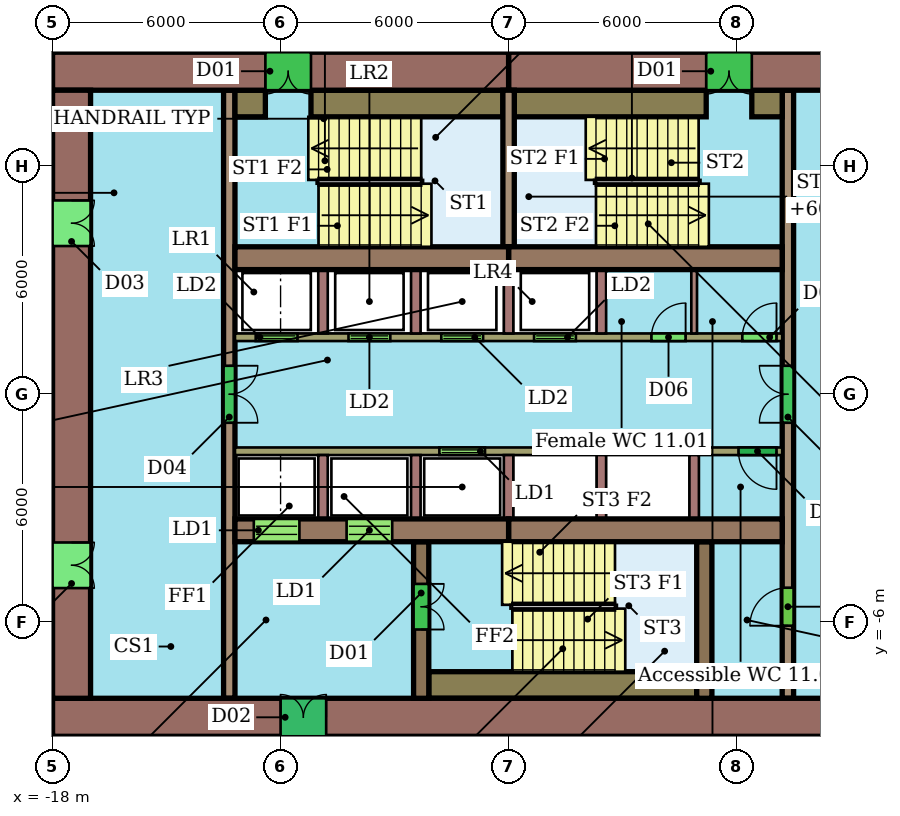
"""IFC4 building model, lengths in metres.
Left out: names, types, materials, properties, quantities, classifications, styles, units other than length and angle.
Written with IfcOpenShell. Run it as: python <this file> out.ifc"""

import sys

from ifc_helpers import new_model, si_unit, direction, frame, frame_2d, origin, place, context, subcontext, project, spatial, rectangle, extrude, element, fill, save


model = new_model("IFC4")
c1 = context("Model", 3, precision=1e-05, world=origin(), true_north=direction((0.0, 1.0)))
c2 = subcontext(c1, "Body", "Model", "MODEL_VIEW")
j1 = project(units=[si_unit("LENGTHUNIT", "METRE"), si_unit("PLANEANGLEUNIT", "RADIAN")], contexts=[c1])
p1 = place(None, origin())
s1 = spatial("IfcSite", under=j1, at=p1, CompositionType="ELEMENT")
p2 = place(p1, origin())
s2 = spatial("IfcBuilding", under=s1, at=p2, CompositionType="ELEMENT")
p3 = place(p2, frame((0.0, 0.0, 58.2)))
s3 = spatial("IfcBuildingStorey", under=s2, at=p3, CompositionType="ELEMENT", Elevation=58.2)
p4 = place(p3, frame((6.0, 8.5, 0.0), z_axis=(0.0, 0.0, 1.0), x_axis=(-1.0, 0.0, 0.0)))
e1 = element("IfcWall", 1, at=p4, inside=s3, PredefinedType="SHEAR", context=c2, shape_type="SweptSolid", body=[
    extrude(rectangle(XDim=12.0, YDim=1.0, at=frame_2d((6.0, 0.0))), origin(), (0.0, 0.0, 1.0), 3.4),
])
p5 = place(p4, frame((5.6, 0.0, 0.0)))
e2 = element("IfcOpeningElement", 2, at=p5, cuts=e1, PredefinedType="OPENING", context=c2, shape_type="SweptSolid", body=[
    extrude(rectangle(XDim=1.2, YDim=2.1, at=frame_2d((0.6, 1.05))), frame((0.0, 0.51, 0.0), z_axis=(0.0, -1.0, 0.0), x_axis=(1.0, 0.0, 0.0)), (0.0, 0.0, 1.0), 1.02),
])
p6 = place(p3, frame((-6.0, 8.5, 0.0), z_axis=(0.0, 0.0, 1.0), x_axis=(-1.0, 0.0, 0.0)))
e3 = element("IfcWall", 3, at=p6, inside=s3, PredefinedType="SHEAR", context=c2, shape_type="SweptSolid", body=[
    extrude(rectangle(XDim=12.0, YDim=1.0, at=frame_2d((6.0, 0.0))), origin(), (0.0, 0.0, 1.0), 3.4),
])
p7 = place(p6, frame((5.2, 0.0, 0.0)))
e4 = element("IfcOpeningElement", 4, at=p7, cuts=e3, PredefinedType="OPENING", context=c2, shape_type="SweptSolid", body=[
    extrude(rectangle(XDim=1.2, YDim=2.1, at=frame_2d((0.6, 1.05))), frame((0.0, 0.51, 0.0), z_axis=(0.0, -1.0, 0.0), x_axis=(1.0, 0.0, 0.0)), (0.0, 0.0, 1.0), 1.02),
])
p8 = place(p3, frame((-18.0, -8.5, 0.0), z_axis=(0.0, 0.0, 1.0), x_axis=(1.0, 0.0, 0.0)))
e5 = element("IfcWall", 5, at=p8, inside=s3, PredefinedType="SHEAR", context=c2, shape_type="SweptSolid", body=[
    extrude(rectangle(XDim=24.0, YDim=1.0, at=frame_2d((12.0, 0.0))), origin(), (0.0, 0.0, 1.0), 3.4),
])
p9 = place(p8, frame((6.0, 0.0, 0.0)))
e6 = element("IfcOpeningElement", 6, at=p9, cuts=e5, PredefinedType="OPENING", context=c2, shape_type="SweptSolid", body=[
    extrude(rectangle(XDim=1.2, YDim=2.1, at=frame_2d((0.6, 1.05))), frame((0.0, 0.51, 0.0), z_axis=(0.0, -1.0, 0.0), x_axis=(1.0, 0.0, 0.0)), (0.0, 0.0, 1.0), 1.02),
])
p10 = place(p3, frame((-17.5, 8.0, 0.0), z_axis=(0.0, 0.0, 1.0), x_axis=(0.0, -1.0, 0.0)))
e7 = element("IfcWall", 7, at=p10, inside=s3, PredefinedType="SHEAR", context=c2, shape_type="SweptSolid", body=[
    extrude(rectangle(XDim=16.0, YDim=1.0, at=frame_2d((8.0, 0.0))), origin(), (0.0, 0.0, 1.0), 3.4),
])
p11 = place(p10, frame((11.9, 0.0, 0.0)))
e8 = element("IfcOpeningElement", 8, at=p11, cuts=e7, PredefinedType="OPENING", context=c2, shape_type="SweptSolid", body=[
    extrude(rectangle(XDim=1.2, YDim=2.1, at=frame_2d((0.6, 1.05))), frame((0.0, 0.51, 0.0), z_axis=(0.0, -1.0, 0.0), x_axis=(1.0, 0.0, 0.0)), (0.0, 0.0, 1.0), 1.02),
])
p12 = place(p10, frame((2.9, 0.0, 0.0)))
e9 = element("IfcOpeningElement", 9, at=p12, cuts=e7, PredefinedType="OPENING", context=c2, shape_type="SweptSolid", body=[
    extrude(rectangle(XDim=1.2, YDim=2.1, at=frame_2d((0.6, 1.05))), frame((0.0, 0.51, 0.0), z_axis=(0.0, -1.0, 0.0), x_axis=(1.0, 0.0, 0.0)), (0.0, 0.0, 1.0), 1.02),
])
for number, where, z_axis, x_axis in (
    (10, (-13.2, 3.58, 0.0), (0.0, 0.0, 1.0), (1.0, 0.0, 0.0)),
    (11, (-6.0, 3.58, 0.0), (0.0, 0.0, 1.0), (1.0, 0.0, 0.0)),
):
    element("IfcWall", number, at=place(p3, frame(where, z_axis=z_axis, x_axis=x_axis)), inside=s3, PredefinedType="SHEAR", context=c2, shape_type="SweptSolid", body=[
        extrude(rectangle(XDim=7.2, YDim=0.6, at=frame_2d((3.6, 0.0))), origin(), (0.0, 0.0, 1.0), 3.4),
    ])
p13 = place(p3, frame((-13.2, -3.58, 0.0), z_axis=(0.0, 0.0, 1.0), x_axis=(1.0, 0.0, 0.0)))
e12 = element("IfcWall", 12, at=p13, inside=s3, PredefinedType="SHEAR", context=c2, shape_type="SweptSolid", body=[
    extrude(rectangle(XDim=7.2, YDim=0.6, at=frame_2d((3.6, 0.0))), origin(), (0.0, 0.0, 1.0), 3.4),
])
p14 = place(p13, frame((0.496, 0.0, 0.0)))
e13 = element("IfcOpeningElement", 13, at=p14, cuts=e12, PredefinedType="OPENING", context=c2, shape_type="SweptSolid", body=[
    extrude(rectangle(XDim=1.2, YDim=2.1, at=frame_2d((0.6, 1.05))), frame((0.0, 0.31, 0.0), z_axis=(0.0, -1.0, 0.0), x_axis=(1.0, 0.0, 0.0)), (0.0, 0.0, 1.0), 0.62),
])
p15 = place(p13, frame((2.938, 0.0, 0.0)))
e14 = element("IfcOpeningElement", 14, at=p15, cuts=e12, PredefinedType="OPENING", context=c2, shape_type="SweptSolid", body=[
    extrude(rectangle(XDim=1.2, YDim=2.1, at=frame_2d((0.6, 1.05))), frame((0.0, 0.31, 0.0), z_axis=(0.0, -1.0, 0.0), x_axis=(1.0, 0.0, 0.0)), (0.0, 0.0, 1.0), 0.62),
])
p16 = place(p3, frame((-6.0, -3.58, 0.0), z_axis=(0.0, 0.0, 1.0), x_axis=(1.0, 0.0, 0.0)))
e15 = element("IfcWall", 15, at=p16, inside=s3, PredefinedType="SHEAR", context=c2, shape_type="SweptSolid", body=[
    extrude(rectangle(XDim=7.2, YDim=0.6, at=frame_2d((3.6, 0.0))), origin(), (0.0, 0.0, 1.0), 3.4),
])
p17 = place(p3, frame((-13.35, 8.0, 0.0), z_axis=(0.0, 0.0, 1.0), x_axis=(0.0, -1.0, 0.0)))
e16 = element("IfcWall", 16, at=p17, inside=s3, PredefinedType="SHEAR", context=c2, shape_type="SweptSolid", body=[
    extrude(rectangle(XDim=16.0, YDim=0.3, at=frame_2d((8.0, 0.0))), origin(), (0.0, 0.0, 1.0), 3.4),
])
p18 = place(p17, frame((7.25, 0.0, 0.0)))
e17 = element("IfcOpeningElement", 17, at=p18, cuts=e16, PredefinedType="OPENING", context=c2, shape_type="SweptSolid", body=[
    extrude(rectangle(XDim=1.5, YDim=2.1, at=frame_2d((0.75, 1.05))), frame((0.0, 0.16, 0.0), z_axis=(0.0, -1.0, 0.0), x_axis=(1.0, 0.0, 0.0)), (0.0, 0.0, 1.0), 0.32),
])
p19 = place(p3, frame((1.35, -8.0, 0.0), z_axis=(0.0, 0.0, 1.0), x_axis=(0.0, 1.0, 0.0)))
e18 = element("IfcWall", 18, at=p19, inside=s3, PredefinedType="SHEAR", context=c2, shape_type="SweptSolid", body=[
    extrude(rectangle(XDim=16.0, YDim=0.3, at=frame_2d((8.0, 0.0))), origin(), (0.0, 0.0, 1.0), 3.4),
])
p20 = place(p19, frame((1.91, 0.0, 0.0)))
e19 = element("IfcOpeningElement", 19, at=p20, cuts=e18, PredefinedType="OPENING", context=c2, shape_type="SweptSolid", body=[
    extrude(rectangle(XDim=1.0, YDim=2.1, at=frame_2d((0.5, 1.05))), frame((0.0, 0.16, 0.0), z_axis=(0.0, -1.0, 0.0), x_axis=(1.0, 0.0, 0.0)), (0.0, 0.0, 1.0), 0.32),
])
p21 = place(p19, frame((7.25, 0.0, 0.0)))
e20 = element("IfcOpeningElement", 20, at=p21, cuts=e18, PredefinedType="OPENING", context=c2, shape_type="SweptSolid", body=[
    extrude(rectangle(XDim=1.5, YDim=2.1, at=frame_2d((0.75, 1.05))), frame((0.0, 0.16, 0.0), z_axis=(0.0, -1.0, 0.0), x_axis=(1.0, 0.0, 0.0)), (0.0, 0.0, 1.0), 0.32),
])
p22 = place(p3, frame((-13.2, 1.5, 0.0), z_axis=(0.0, 0.0, 1.0), x_axis=(1.0, 0.0, 0.0)))
e21 = element("IfcWall", 21, at=p22, inside=s3, PredefinedType="SHEAR", context=c2, shape_type="SweptSolid", body=[
    extrude(rectangle(XDim=14.4, YDim=0.2, at=frame_2d((7.2, 0.0))), origin(), (0.0, 0.0, 1.0), 3.4),
])
p23 = place(p22, frame((0.546, 0.0, 0.0)))
e22 = element("IfcOpeningElement", 22, at=p23, cuts=e21, PredefinedType="OPENING", context=c2, shape_type="SweptSolid", body=[
    extrude(rectangle(XDim=1.1, YDim=2.1, at=frame_2d((0.55, 1.05))), frame((0.0, 0.11, 0.0), z_axis=(0.0, -1.0, 0.0), x_axis=(1.0, 0.0, 0.0)), (0.0, 0.0, 1.0), 0.22),
])
p24 = place(p22, frame((2.988, 0.0, 0.0)))
e23 = element("IfcOpeningElement", 23, at=p24, cuts=e21, PredefinedType="OPENING", context=c2, shape_type="SweptSolid", body=[
    extrude(rectangle(XDim=1.1, YDim=2.1, at=frame_2d((0.55, 1.05))), frame((0.0, 0.11, 0.0), z_axis=(0.0, -1.0, 0.0), x_axis=(1.0, 0.0, 0.0)), (0.0, 0.0, 1.0), 0.22),
])
p25 = place(p22, frame((5.429, 0.0, 0.0)))
e24 = element("IfcOpeningElement", 24, at=p25, cuts=e21, PredefinedType="OPENING", context=c2, shape_type="SweptSolid", body=[
    extrude(rectangle(XDim=1.1, YDim=2.1, at=frame_2d((0.55, 1.05))), frame((0.0, 0.11, 0.0), z_axis=(0.0, -1.0, 0.0), x_axis=(1.0, 0.0, 0.0)), (0.0, 0.0, 1.0), 0.22),
])
p26 = place(p22, frame((7.871, 0.0, 0.0)))
e25 = element("IfcOpeningElement", 25, at=p26, cuts=e21, PredefinedType="OPENING", context=c2, shape_type="SweptSolid", body=[
    extrude(rectangle(XDim=1.1, YDim=2.1, at=frame_2d((0.55, 1.05))), frame((0.0, 0.11, 0.0), z_axis=(0.0, -1.0, 0.0), x_axis=(1.0, 0.0, 0.0)), (0.0, 0.0, 1.0), 0.22),
])
p27 = place(p22, frame((10.958, 0.0, 0.0)))
e26 = element("IfcOpeningElement", 26, at=p27, cuts=e21, PredefinedType="OPENING", context=c2, shape_type="SweptSolid", body=[
    extrude(rectangle(XDim=0.9, YDim=2.1, at=frame_2d((0.45, 1.05))), frame((0.0, 0.11, 0.0), z_axis=(0.0, -1.0, 0.0), x_axis=(1.0, 0.0, 0.0)), (0.0, 0.0, 1.0), 0.22),
])
p28 = place(p22, frame((13.35, 0.0, 0.0)))
e27 = element("IfcOpeningElement", 27, at=p28, cuts=e21, PredefinedType="OPENING", context=c2, shape_type="SweptSolid", body=[
    extrude(rectangle(XDim=0.9, YDim=2.1, at=frame_2d((0.45, 1.05))), frame((0.0, 0.11, 0.0), z_axis=(0.0, -1.0, 0.0), x_axis=(1.0, 0.0, 0.0)), (0.0, 0.0, 1.0), 0.22),
])
p29 = place(p3, frame((1.2, -1.5, 0.0), z_axis=(0.0, 0.0, 1.0), x_axis=(-1.0, 0.0, 0.0)))
e28 = element("IfcWall", 28, at=p29, inside=s3, PredefinedType="SHEAR", context=c2, shape_type="SweptSolid", body=[
    extrude(rectangle(XDim=14.4, YDim=0.2, at=frame_2d((7.2, 0.0))), origin(), (0.0, 0.0, 1.0), 3.4),
])
p30 = place(p29, frame((7.821, 0.0, 0.0)))
e29 = element("IfcOpeningElement", 29, at=p30, cuts=e28, PredefinedType="OPENING", context=c2, shape_type="SweptSolid", body=[
    extrude(rectangle(XDim=1.2, YDim=2.1, at=frame_2d((0.6, 1.05))), frame((0.0, 0.11, 0.0), z_axis=(0.0, -1.0, 0.0), x_axis=(1.0, 0.0, 0.0)), (0.0, 0.0, 1.0), 0.22),
])
p31 = place(p29, frame((0.15, 0.0, 0.0)))
e30 = element("IfcOpeningElement", 30, at=p31, cuts=e28, PredefinedType="OPENING", context=c2, shape_type="SweptSolid", body=[
    extrude(rectangle(XDim=1.0, YDim=2.1, at=frame_2d((0.5, 1.05))), frame((0.0, 0.11, 0.0), z_axis=(0.0, -1.0, 0.0), x_axis=(1.0, 0.0, 0.0)), (0.0, 0.0, 1.0), 0.22),
])
p32 = place(p3, frame((-8.3, -3.88, 0.0), z_axis=(0.0, 0.0, 1.0), x_axis=(0.0, -1.0, 0.0)))
e31 = element("IfcWall", 31, at=p32, inside=s3, PredefinedType="SHEAR", context=c2, shape_type="SweptSolid", body=[
    extrude(rectangle(XDim=4.12, YDim=0.4, at=frame_2d((2.06, 0.0))), origin(), (0.0, 0.0, 1.0), 3.4),
])
p33 = place(p32, frame((1.11, 0.0, 0.0)))
e32 = element("IfcOpeningElement", 32, at=p33, cuts=e31, PredefinedType="OPENING", context=c2, shape_type="SweptSolid", body=[
    extrude(rectangle(XDim=1.2, YDim=2.1, at=frame_2d((0.6, 1.05))), frame((0.0, 0.21, 0.0), z_axis=(0.0, -1.0, 0.0), x_axis=(1.0, 0.0, 0.0)), (0.0, 0.0, 1.0), 0.42),
])
p34 = place(p3, frame((-0.85, -3.88, 0.0), z_axis=(0.0, 0.0, 1.0), x_axis=(0.0, -1.0, 0.0)))
e33 = element("IfcWall", 33, at=p34, inside=s3, PredefinedType="SHEAR", context=c2, shape_type="SweptSolid", body=[
    extrude(rectangle(XDim=4.12, YDim=0.4, at=frame_2d((2.06, 0.0))), origin(), (0.0, 0.0, 1.0), 3.4),
])
p35 = place(p3, frame((-6.0, 3.88, 0.0), z_axis=(0.0, 0.0, 1.0), x_axis=(0.0, 1.0, 0.0)))
e34 = element("IfcWall", 34, at=p35, inside=s3, PredefinedType="SHEAR", context=c2, shape_type="SweptSolid", body=[
    extrude(rectangle(XDim=4.12, YDim=0.3, at=frame_2d((2.06, 0.0))), origin(), (0.0, 0.0, 1.0), 3.4),
])
p36 = place(p3, frame((-13.2, 7.65, 0.0), z_axis=(0.0, 0.0, 1.0), x_axis=(1.0, 0.0, 0.0)))
e35 = element("IfcWall", 35, at=p36, inside=s3, PredefinedType="SHEAR", context=c2, shape_type="SweptSolid", body=[
    extrude(rectangle(XDim=0.8, YDim=0.7, at=frame_2d((0.4, 0.0))), origin(), (0.0, 0.0, 1.0), 3.4),
])
for number, where, z_axis, x_axis in (
    (36, (-11.2, 7.65, 0.0), (0.0, 0.0, 1.0), (1.0, 0.0, 0.0)),
    (37, (-5.85, 7.65, 0.0), (0.0, 0.0, 1.0), (1.0, 0.0, 0.0)),
):
    element("IfcWall", number, at=place(p3, frame(where, z_axis=z_axis, x_axis=x_axis)), inside=s3, PredefinedType="SHEAR", context=c2, shape_type="SweptSolid", body=[
        extrude(rectangle(XDim=5.05, YDim=0.7, at=frame_2d((2.525, 0.0))), origin(), (0.0, 0.0, 1.0), 3.4),
    ])
p37 = place(p3, frame((0.4, 7.65, 0.0), z_axis=(0.0, 0.0, 1.0), x_axis=(1.0, 0.0, 0.0)))
e38 = element("IfcWall", 38, at=p37, inside=s3, PredefinedType="SHEAR", context=c2, shape_type="SweptSolid", body=[
    extrude(rectangle(XDim=0.8, YDim=0.7, at=frame_2d((0.4, 0.0))), origin(), (0.0, 0.0, 1.0), 3.4),
])
p38 = place(p3, frame((-8.1, -7.65, 0.0), z_axis=(0.0, 0.0, 1.0), x_axis=(1.0, 0.0, 0.0)))
e39 = element("IfcWall", 39, at=p38, inside=s3, PredefinedType="SHEAR", context=c2, shape_type="SweptSolid", body=[
    extrude(rectangle(XDim=7.05, YDim=0.7, at=frame_2d((3.525, 0.0))), origin(), (0.0, 0.0, 1.0), 3.4),
])
for number, where, z_axis, x_axis in (
    (40, (-10.883, 1.6, 0.0), (0.0, 0.0, 1.0), (0.0, 1.0, 0.0)),
    (41, (-8.442, 1.6, 0.0), (0.0, 0.0, 1.0), (0.0, 1.0, 0.0)),
    (42, (-6.0, 1.6, 0.0), (0.0, 0.0, 1.0), (0.0, 1.0, 0.0)),
    (43, (-3.558, 1.6, 0.0), (0.0, 0.0, 1.0), (0.0, 1.0, 0.0)),
):
    element("IfcWall", number, at=place(p3, frame(where, z_axis=z_axis, x_axis=x_axis)), inside=s3, PredefinedType="SHEAR", context=c2, shape_type="SweptSolid", body=[
        extrude(rectangle(XDim=1.68, YDim=0.25, at=frame_2d((0.84, 0.0))), origin(), (0.0, 0.0, 1.0), 3.4),
    ])
p39 = place(p3, frame((-1.117, 1.6, 0.0), z_axis=(0.0, 0.0, 1.0), x_axis=(0.0, 1.0, 0.0)))
e44 = element("IfcWall", 44, at=p39, inside=s3, PredefinedType="PARTITIONING", context=c2, shape_type="SweptSolid", body=[
    extrude(rectangle(XDim=1.68, YDim=0.15, at=frame_2d((0.84, 0.0))), origin(), (0.0, 0.0, 1.0), 3.4),
])
for number, where, z_axis, x_axis in (
    (45, (-10.883, -1.6, 0.0), (0.0, 0.0, 1.0), (0.0, -1.0, 0.0)),
    (46, (-8.442, -1.6, 0.0), (0.0, 0.0, 1.0), (0.0, -1.0, 0.0)),
    (47, (-6.0, -1.6, 0.0), (0.0, 0.0, 1.0), (0.0, -1.0, 0.0)),
    (48, (-3.558, -1.6, 0.0), (0.0, 0.0, 1.0), (0.0, -1.0, 0.0)),
    (49, (-1.117, -1.6, 0.0), (0.0, 0.0, 1.0), (0.0, -1.0, 0.0)),
):
    element("IfcWall", number, at=place(p3, frame(where, z_axis=z_axis, x_axis=x_axis)), inside=s3, PredefinedType="SHEAR", context=c2, shape_type="SweptSolid", body=[
        extrude(rectangle(XDim=1.68, YDim=0.25, at=frame_2d((0.84, 0.0))), origin(), (0.0, 0.0, 1.0), 3.4),
    ])
p40 = place(p5, origin())
e50 = element("IfcDoor", 50, at=p40, inside=s3, OperationType="DOUBLE_DOOR_SINGLE_SWING", PredefinedType="NOTDEFINED", context=c2, shape_type="SweptSolid", body=[
    extrude(rectangle(XDim=1.2, YDim=2.1, at=frame_2d((0.6, 1.05))), frame((0.0, 0.025, 0.0), z_axis=(0.0, -1.0, 0.0), x_axis=(1.0, 0.0, 0.0)), (0.0, 0.0, 1.0), 0.05),
])
fill(e2, e50)
p41 = place(p7, origin())
e51 = element("IfcDoor", 51, at=p41, inside=s3, OperationType="DOUBLE_DOOR_SINGLE_SWING", PredefinedType="NOTDEFINED", context=c2, shape_type="SweptSolid", body=[
    extrude(rectangle(XDim=1.2, YDim=2.1, at=frame_2d((0.6, 1.05))), frame((0.0, 0.025, 0.0), z_axis=(0.0, -1.0, 0.0), x_axis=(1.0, 0.0, 0.0)), (0.0, 0.0, 1.0), 0.05),
])
fill(e4, e51)
p42 = place(p9, origin())
e52 = element("IfcDoor", 52, at=p42, inside=s3, OperationType="DOUBLE_DOOR_SINGLE_SWING", PredefinedType="NOTDEFINED", context=c2, shape_type="SweptSolid", body=[
    extrude(rectangle(XDim=1.2, YDim=2.1, at=frame_2d((0.6, 1.05))), frame((0.0, 0.025, 0.0), z_axis=(0.0, -1.0, 0.0), x_axis=(1.0, 0.0, 0.0)), (0.0, 0.0, 1.0), 0.05),
])
fill(e6, e52)
p43 = place(p11, origin())
e53 = element("IfcDoor", 53, at=p43, inside=s3, OperationType="DOUBLE_DOOR_SINGLE_SWING", PredefinedType="NOTDEFINED", context=c2, shape_type="SweptSolid", body=[
    extrude(rectangle(XDim=1.2, YDim=2.1, at=frame_2d((0.6, 1.05))), frame((0.0, 0.025, 0.0), z_axis=(0.0, -1.0, 0.0), x_axis=(1.0, 0.0, 0.0)), (0.0, 0.0, 1.0), 0.05),
])
fill(e8, e53)
p44 = place(p12, origin())
e54 = element("IfcDoor", 54, at=p44, inside=s3, OperationType="DOUBLE_DOOR_SINGLE_SWING", PredefinedType="NOTDEFINED", context=c2, shape_type="SweptSolid", body=[
    extrude(rectangle(XDim=1.2, YDim=2.1, at=frame_2d((0.6, 1.05))), frame((0.0, 0.025, 0.0), z_axis=(0.0, -1.0, 0.0), x_axis=(1.0, 0.0, 0.0)), (0.0, 0.0, 1.0), 0.05),
])
fill(e9, e54)
p45 = place(p14, origin())
e55 = element("IfcDoor", 55, at=p45, inside=s3, OperationType="DOUBLE_DOOR_SLIDING", PredefinedType="NOTDEFINED", context=c2, shape_type="SweptSolid", body=[
    extrude(rectangle(XDim=1.2, YDim=2.1, at=frame_2d((0.6, 1.05))), frame((0.0, 0.025, 0.0), z_axis=(0.0, -1.0, 0.0), x_axis=(1.0, 0.0, 0.0)), (0.0, 0.0, 1.0), 0.05),
])
fill(e13, e55)
p46 = place(p15, origin())
e56 = element("IfcDoor", 56, at=p46, inside=s3, OperationType="DOUBLE_DOOR_SLIDING", PredefinedType="NOTDEFINED", context=c2, shape_type="SweptSolid", body=[
    extrude(rectangle(XDim=1.2, YDim=2.1, at=frame_2d((0.6, 1.05))), frame((0.0, 0.025, 0.0), z_axis=(0.0, -1.0, 0.0), x_axis=(1.0, 0.0, 0.0)), (0.0, 0.0, 1.0), 0.05),
])
fill(e14, e56)
p47 = place(p18, origin())
e57 = element("IfcDoor", 57, at=p47, inside=s3, OperationType="DOUBLE_DOOR_SINGLE_SWING", PredefinedType="NOTDEFINED", context=c2, shape_type="SweptSolid", body=[
    extrude(rectangle(XDim=1.5, YDim=2.1, at=frame_2d((0.75, 1.05))), frame((0.0, 0.025, 0.0), z_axis=(0.0, -1.0, 0.0), x_axis=(1.0, 0.0, 0.0)), (0.0, 0.0, 1.0), 0.05),
])
fill(e17, e57)
p48 = place(p20, origin())
e58 = element("IfcDoor", 58, at=p48, inside=s3, OperationType="SINGLE_SWING_LEFT", PredefinedType="NOTDEFINED", context=c2, shape_type="SweptSolid", body=[
    extrude(rectangle(XDim=1.0, YDim=2.1, at=frame_2d((0.5, 1.05))), frame((0.0, 0.025, 0.0), z_axis=(0.0, -1.0, 0.0), x_axis=(1.0, 0.0, 0.0)), (0.0, 0.0, 1.0), 0.05),
])
fill(e19, e58)
p49 = place(p21, origin())
e59 = element("IfcDoor", 59, at=p49, inside=s3, OperationType="DOUBLE_DOOR_SINGLE_SWING", PredefinedType="NOTDEFINED", context=c2, shape_type="SweptSolid", body=[
    extrude(rectangle(XDim=1.5, YDim=2.1, at=frame_2d((0.75, 1.05))), frame((0.0, 0.025, 0.0), z_axis=(0.0, -1.0, 0.0), x_axis=(1.0, 0.0, 0.0)), (0.0, 0.0, 1.0), 0.05),
])
fill(e20, e59)
p50 = place(p23, origin())
e60 = element("IfcDoor", 60, at=p50, inside=s3, OperationType="DOUBLE_DOOR_SLIDING", PredefinedType="NOTDEFINED", context=c2, shape_type="SweptSolid", body=[
    extrude(rectangle(XDim=1.1, YDim=2.1, at=frame_2d((0.55, 1.05))), frame((0.0, 0.025, 0.0), z_axis=(0.0, -1.0, 0.0), x_axis=(1.0, 0.0, 0.0)), (0.0, 0.0, 1.0), 0.05),
])
fill(e22, e60)
p51 = place(p24, origin())
e61 = element("IfcDoor", 61, at=p51, inside=s3, OperationType="DOUBLE_DOOR_SLIDING", PredefinedType="NOTDEFINED", context=c2, shape_type="SweptSolid", body=[
    extrude(rectangle(XDim=1.1, YDim=2.1, at=frame_2d((0.55, 1.05))), frame((0.0, 0.025, 0.0), z_axis=(0.0, -1.0, 0.0), x_axis=(1.0, 0.0, 0.0)), (0.0, 0.0, 1.0), 0.05),
])
fill(e23, e61)
p52 = place(p25, origin())
e62 = element("IfcDoor", 62, at=p52, inside=s3, OperationType="DOUBLE_DOOR_SLIDING", PredefinedType="NOTDEFINED", context=c2, shape_type="SweptSolid", body=[
    extrude(rectangle(XDim=1.1, YDim=2.1, at=frame_2d((0.55, 1.05))), frame((0.0, 0.025, 0.0), z_axis=(0.0, -1.0, 0.0), x_axis=(1.0, 0.0, 0.0)), (0.0, 0.0, 1.0), 0.05),
])
fill(e24, e62)
p53 = place(p26, origin())
e63 = element("IfcDoor", 63, at=p53, inside=s3, OperationType="DOUBLE_DOOR_SLIDING", PredefinedType="NOTDEFINED", context=c2, shape_type="SweptSolid", body=[
    extrude(rectangle(XDim=1.1, YDim=2.1, at=frame_2d((0.55, 1.05))), frame((0.0, 0.025, 0.0), z_axis=(0.0, -1.0, 0.0), x_axis=(1.0, 0.0, 0.0)), (0.0, 0.0, 1.0), 0.05),
])
fill(e25, e63)
p54 = place(p27, origin())
e64 = element("IfcDoor", 64, at=p54, inside=s3, OperationType="SINGLE_SWING_RIGHT", PredefinedType="NOTDEFINED", context=c2, shape_type="SweptSolid", body=[
    extrude(rectangle(XDim=0.9, YDim=2.1, at=frame_2d((0.45, 1.05))), frame((0.0, 0.025, 0.0), z_axis=(0.0, -1.0, 0.0), x_axis=(1.0, 0.0, 0.0)), (0.0, 0.0, 1.0), 0.05),
])
fill(e26, e64)
p55 = place(p28, origin())
e65 = element("IfcDoor", 65, at=p55, inside=s3, OperationType="SINGLE_SWING_RIGHT", PredefinedType="NOTDEFINED", context=c2, shape_type="SweptSolid", body=[
    extrude(rectangle(XDim=0.9, YDim=2.1, at=frame_2d((0.45, 1.05))), frame((0.0, 0.025, 0.0), z_axis=(0.0, -1.0, 0.0), x_axis=(1.0, 0.0, 0.0)), (0.0, 0.0, 1.0), 0.05),
])
fill(e27, e65)
p56 = place(p30, origin())
e66 = element("IfcDoor", 66, at=p56, inside=s3, OperationType="DOUBLE_DOOR_SLIDING", PredefinedType="NOTDEFINED", context=c2, shape_type="SweptSolid", body=[
    extrude(rectangle(XDim=1.2, YDim=2.1, at=frame_2d((0.6, 1.05))), frame((0.0, 0.025, 0.0), z_axis=(0.0, -1.0, 0.0), x_axis=(1.0, 0.0, 0.0)), (0.0, 0.0, 1.0), 0.05),
])
fill(e29, e66)
p57 = place(p31, origin())
e67 = element("IfcDoor", 67, at=p57, inside=s3, OperationType="SINGLE_SWING_LEFT", PredefinedType="NOTDEFINED", context=c2, shape_type="SweptSolid", body=[
    extrude(rectangle(XDim=1.0, YDim=2.1, at=frame_2d((0.5, 1.05))), frame((0.0, 0.025, 0.0), z_axis=(0.0, -1.0, 0.0), x_axis=(1.0, 0.0, 0.0)), (0.0, 0.0, 1.0), 0.05),
])
fill(e30, e67)
p58 = place(p33, origin())
e68 = element("IfcDoor", 68, at=p58, inside=s3, OperationType="DOUBLE_DOOR_SINGLE_SWING", PredefinedType="NOTDEFINED", context=c2, shape_type="SweptSolid", body=[
    extrude(rectangle(XDim=1.2, YDim=2.1, at=frame_2d((0.6, 1.05))), frame((0.0, 0.025, 0.0), z_axis=(0.0, -1.0, 0.0), x_axis=(1.0, 0.0, 0.0)), (0.0, 0.0, 1.0), 0.05),
])
fill(e32, e68)
save(model, sys.argv[1])
